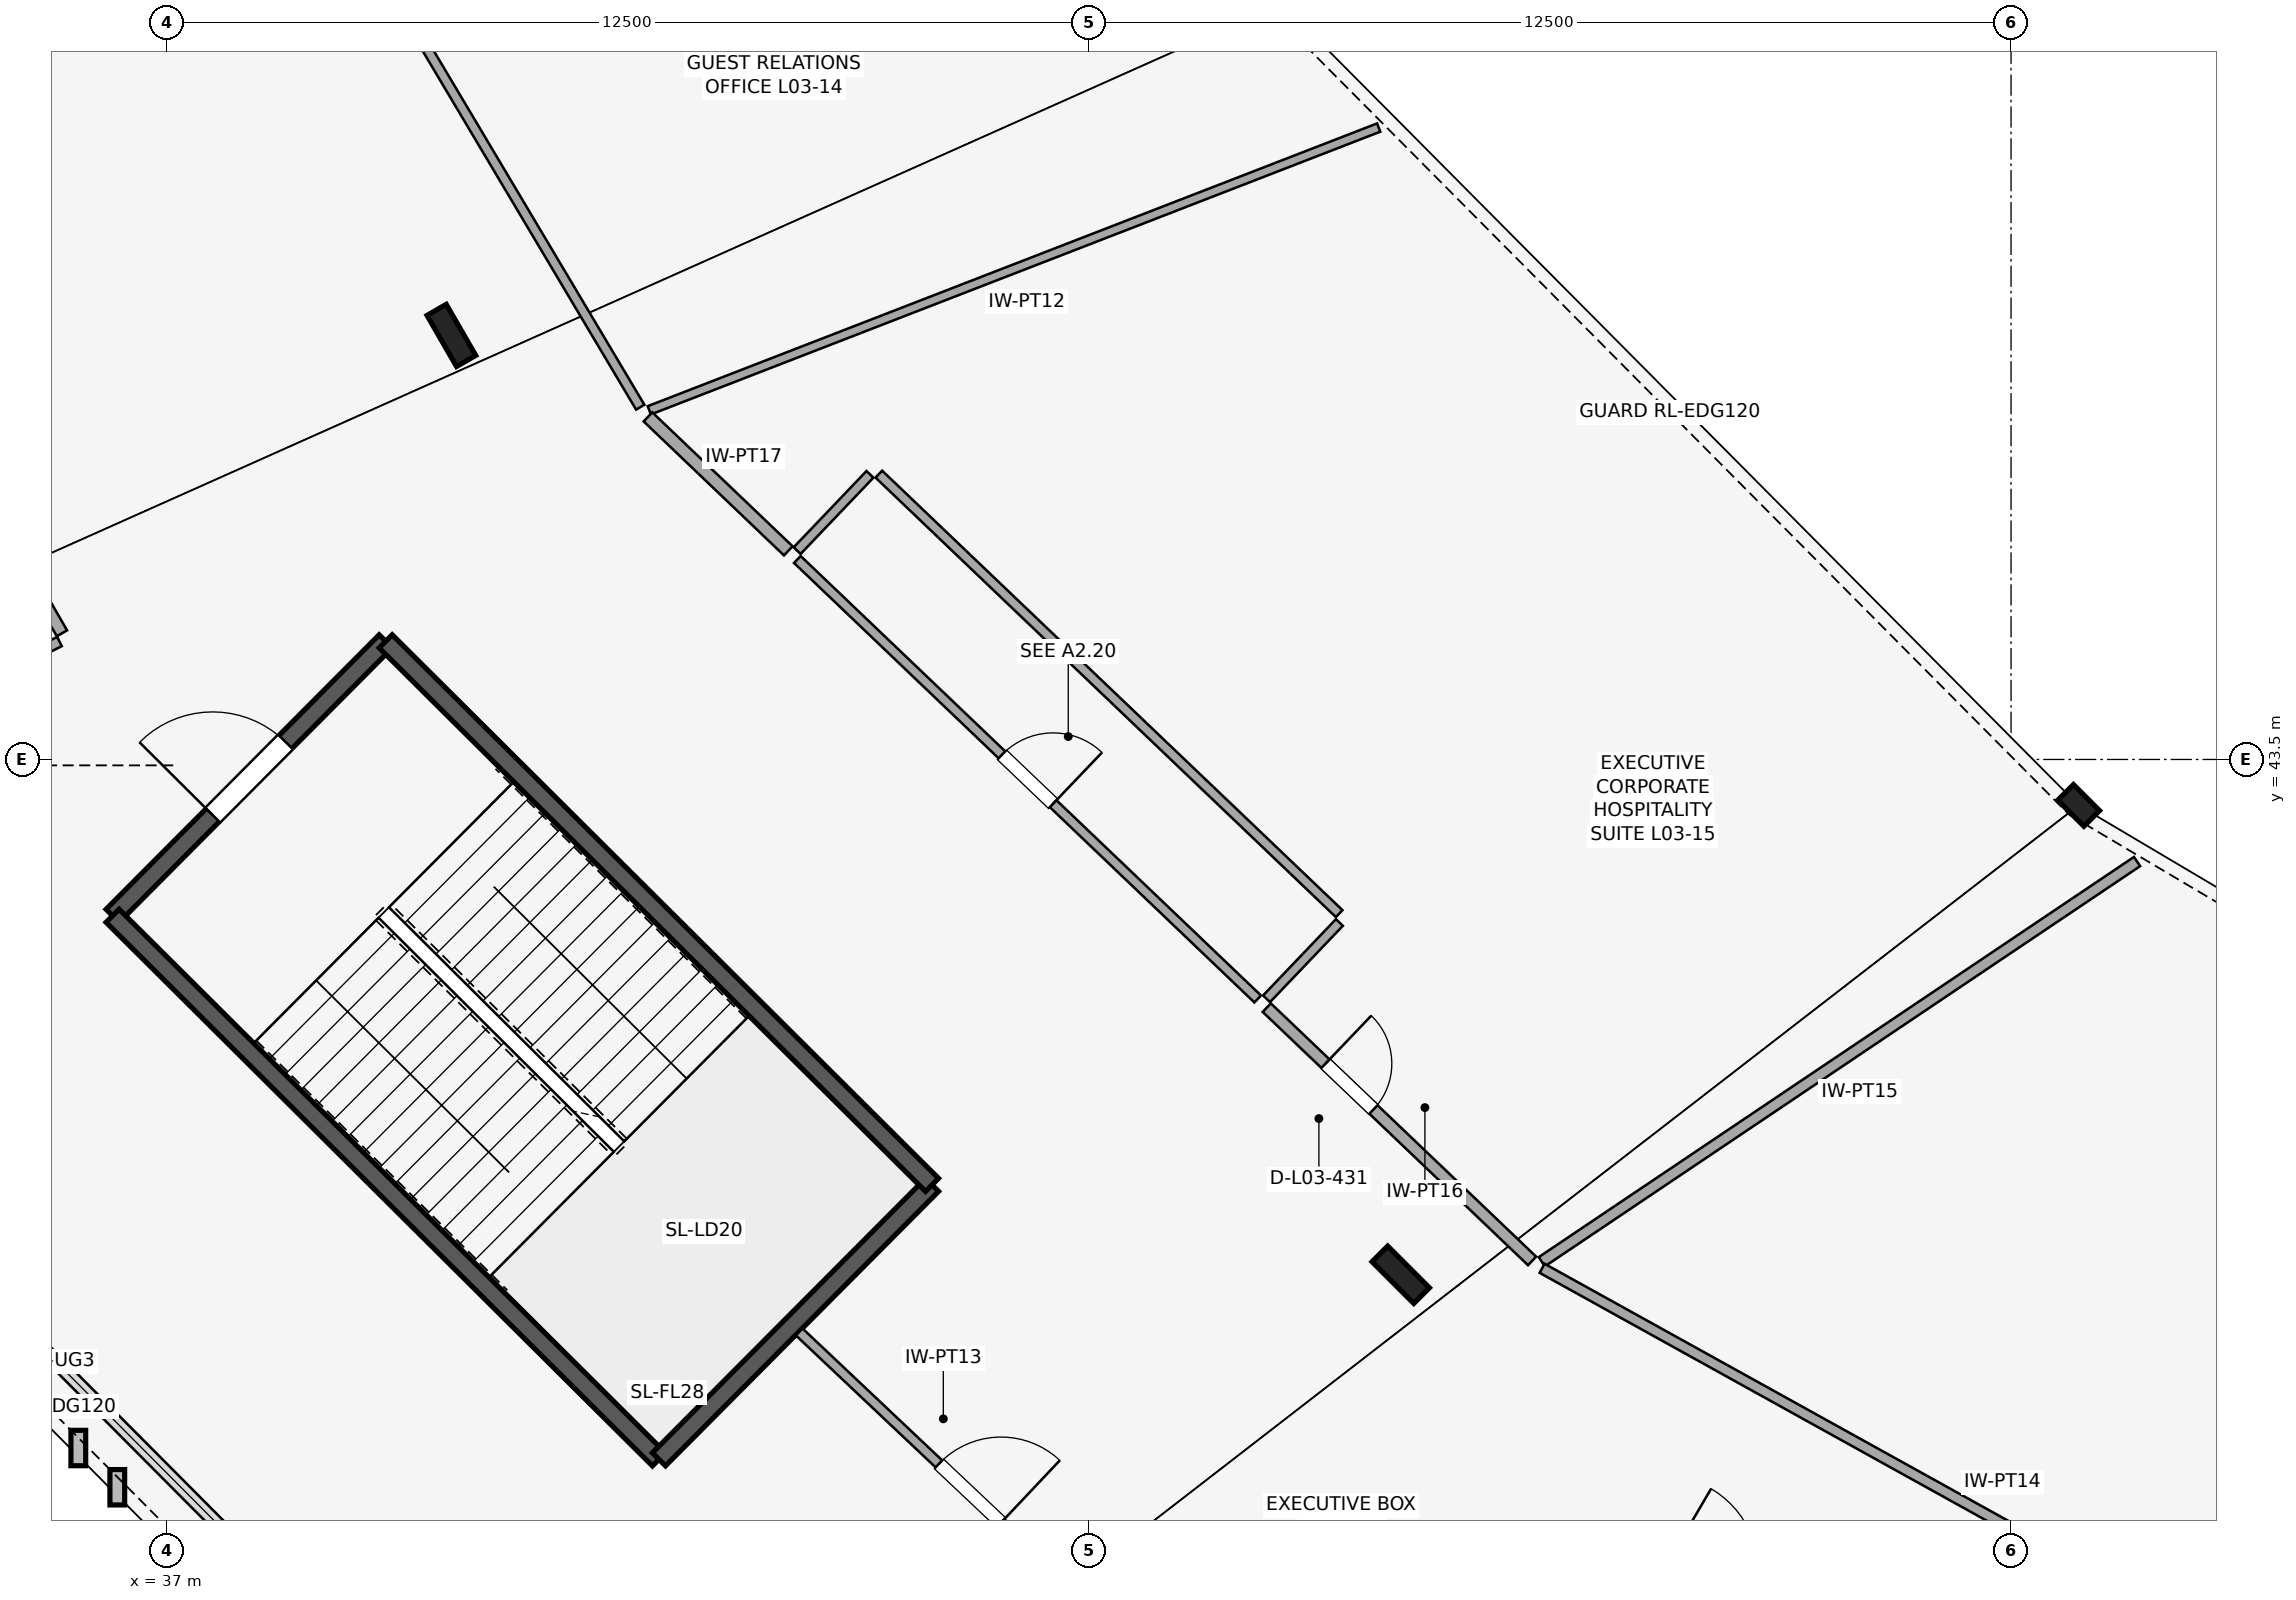
"""IFC4 building model, lengths in metres.
Left out: names, types, materials, properties, quantities, classifications, styles, units other than length and angle.
Written with IfcOpenShell. Run it as: python <this file> out.ifc"""

import sys

from ifc_helpers import new_model, si_unit, direction, frame, frame_2d, origin, origin_2d, place, context, subcontext, project, spatial, rectangle, i_section, extrude, element, fill, save


model = new_model("IFC4")
c1 = context("Model", 3, precision=1e-05, world=origin(), true_north=direction((0.0, 1.0)))
c2 = subcontext(c1, "Body", "Model", "MODEL_VIEW")
j1 = project(units=[si_unit("LENGTHUNIT", "METRE"), si_unit("PLANEANGLEUNIT", "RADIAN")], contexts=[c1])
p1 = place(None, origin())
s1 = spatial("IfcSite", under=j1, at=p1, CompositionType="ELEMENT")
p2 = place(p1, origin())
s2 = spatial("IfcBuilding", under=s1, at=p2, CompositionType="ELEMENT")
p3 = place(p2, frame((0.0, 0.0, 15.6)))
s3 = spatial("IfcBuildingStorey", under=s2, at=p3, CompositionType="ELEMENT", Elevation=15.6)
p4 = place(p3, frame((62.917, 42.877, 0.0), z_axis=(0.0, 0.0, 1.0), x_axis=(-0.707106781187, -0.707106781187, 0.0)))
e1 = element("IfcColumn", 1, at=p4, inside=s3, PredefinedType="COLUMN", context=c2, shape_type="SweptSolid", body=[
    extrude(i_section(OverallWidth=0.3, OverallDepth=0.5, WebThickness=0.014, FlangeThickness=0.028, FilletRadius=0.027, at=origin_2d()), origin(), (0.0, 0.0, 1.0), 3.48),
])
for number, where, z_axis, x_axis in (
    (2, (40.852, 49.25, 0.0), (0.0, 0.0, 1.0), (-0.866, -0.5, 0.0)),
    (3, (53.724, 36.513, 0.0), (0.0, 0.0, 1.0), (-0.707, -0.707, 0.0)),
):
    element("IfcColumn", number, at=place(p3, frame(where, z_axis=z_axis, x_axis=x_axis)), inside=s3, PredefinedType="COLUMN", context=c2, shape_type="SweptSolid", body=[
        extrude(i_section(OverallWidth=0.3, OverallDepth=0.8, WebThickness=0.018, FlangeThickness=0.033, FilletRadius=0.03, at=origin_2d()), origin(), (0.0, 0.0, 1.0), 5.2),
    ])
p5 = place(p3, frame((39.961, 45.102, 0.0), z_axis=(0.0, 0.0, 1.0), x_axis=(-0.705314141126, -0.708894888067, 0.0)))
e4 = element("IfcWall", 4, at=p5, inside=s3, PredefinedType="SHEAR", context=c2, shape_type="SweptSolid", body=[
    extrude(rectangle(XDim=5.25, YDim=0.25, at=frame_2d((2.625, 0.0))), origin(), (0.0, 0.0, 1.0), 4.9),
])
p6 = place(p5, frame((1.925, 0.0, 0.0)))
e5 = element("IfcOpeningElement", 5, at=p6, cuts=e4, PredefinedType="OPENING", context=c2, shape_type="SweptSolid", body=[
    extrude(rectangle(XDim=1.4, YDim=2.2, at=frame_2d((0.7, 1.1))), frame((0.0, 0.135, 0.0), z_axis=(0.0, -1.0, 0.0), x_axis=(1.0, 0.0, 0.0)), (0.0, 0.0, 1.0), 0.27),
])
p7 = place(p3, frame((36.258, 41.38, 0.0), z_axis=(0.0, 0.0, 1.0), x_axis=(0.708891762409, -0.705317282639, 0.0)))
e6 = element("IfcWall", 6, at=p7, inside=s3, PredefinedType="SHEAR", context=c2, shape_type="SweptSolid", body=[
    extrude(rectangle(XDim=10.45, YDim=0.25, at=frame_2d((5.225, 0.0))), origin(), (0.0, 0.0, 1.0), 4.9),
])
p8 = place(p3, frame((43.666, 34.01, 0.0), z_axis=(0.0, 0.0, 1.0), x_axis=(0.705314141126, 0.708894888067, 0.0)))
e7 = element("IfcWall", 7, at=p8, inside=s3, PredefinedType="SHEAR", context=c2, shape_type="SweptSolid", body=[
    extrude(rectangle(XDim=5.25, YDim=0.25, at=frame_2d((2.625, 0.0))), origin(), (0.0, 0.0, 1.0), 4.9),
])
p9 = place(p3, frame((47.369, 37.731, 0.0), z_axis=(0.0, 0.0, 1.0), x_axis=(-0.708891762409, 0.705317282639, 0.0)))
e8 = element("IfcWall", 8, at=p9, inside=s3, PredefinedType="SHEAR", context=c2, shape_type="SweptSolid", body=[
    extrude(rectangle(XDim=10.45, YDim=0.25, at=frame_2d((5.225, 0.0))), origin(), (0.0, 0.0, 1.0), 4.9),
])
p10 = place(p3, frame((34.706, 62.908, 0.0), z_axis=(0.0, 0.0, 1.0), x_axis=(0.51138201062, -0.859353500728, 0.0)))
e9 = element("IfcWall", 9, at=p10, inside=s3, PredefinedType="PARTITIONING", context=c2, shape_type="SweptSolid", body=[
    extrude(rectangle(XDim=17.026, YDim=0.13, at=frame_2d((8.513, 0.0))), origin(), (0.0, 0.0, 1.0), 2.45),
])
p11 = place(p10, frame((7.973, 0.0, 0.0)))
e10 = element("IfcOpeningElement", 10, at=p11, cuts=e9, PredefinedType="OPENING", context=c2, shape_type="SweptSolid", body=[
    extrude(rectangle(XDim=1.08, YDim=2.24, at=frame_2d((0.54, 1.12))), frame((0.0, 0.075, 0.0), z_axis=(0.0, -1.0, 0.0), x_axis=(1.0, 0.0, 0.0)), (0.0, 0.0, 1.0), 0.15),
])
p12 = place(p3, frame((53.425, 52.068, 0.0), z_axis=(0.0, 0.0, 1.0), x_axis=(-0.932396771686, -0.36143638465, 0.0)))
e11 = element("IfcWall", 11, at=p12, inside=s3, PredefinedType="PARTITIONING", context=c2, shape_type="SweptSolid", body=[
    extrude(rectangle(XDim=10.607, YDim=0.12, at=frame_2d((5.303, 0.0))), origin(), (0.0, 0.0, 1.0), 2.45),
])
p13 = place(p3, frame((45.543, 46.212, 0.0), z_axis=(0.0, 0.0, 1.0), x_axis=(0.723282965578, -0.69055177337, 0.0)))
e12 = element("IfcWall", 12, at=p13, inside=s3, PredefinedType="PARTITIONING", context=c2, shape_type="SweptSolid", body=[
    extrude(rectangle(XDim=8.63, YDim=0.13, at=frame_2d((4.315, 0.0))), origin(), (0.0, 0.0, 1.0), 2.45),
])
p14 = place(p13, frame((3.835, 0.0, 0.0)))
e13 = element("IfcOpeningElement", 13, at=p14, cuts=e12, PredefinedType="OPENING", context=c2, shape_type="SweptSolid", body=[
    extrude(rectangle(XDim=0.96, YDim=2.24, at=frame_2d((0.48, 1.12))), frame((0.0, 0.075, 0.0), z_axis=(0.0, -1.0, 0.0), x_axis=(1.0, 0.0, 0.0)), (0.0, 0.0, 1.0), 0.15),
])
p15 = place(p3, frame((46.648, 47.369, 0.0), z_axis=(0.0, 0.0, 1.0), x_axis=(0.723310584954, -0.690522843716, 0.0)))
e14 = element("IfcWall", 14, at=p15, inside=s3, PredefinedType="PARTITIONING", context=c2, shape_type="SweptSolid", body=[
    extrude(rectangle(XDim=8.63, YDim=0.13, at=frame_2d((4.315, 0.0))), origin(), (0.0, 0.0, 1.0), 2.45),
])
p16 = place(p3, frame((45.54, 46.332, 0.0), z_axis=(0.0, 0.0, 1.0), x_axis=(0.690528527034, 0.723305159219, 0.0)))
e15 = element("IfcWall", 15, at=p16, inside=s3, PredefinedType="PARTITIONING", context=c2, shape_type="SweptSolid", body=[
    extrude(rectangle(XDim=1.43, YDim=0.13, at=frame_2d((0.715, 0.0))), origin(), (0.0, 0.0, 1.0), 2.45),
])
p17 = place(p3, frame((51.905, 40.255, 0.0), z_axis=(0.0, 0.0, 1.0), x_axis=(0.690524478899, 0.723309023891, 0.0)))
e16 = element("IfcWall", 16, at=p17, inside=s3, PredefinedType="PARTITIONING", context=c2, shape_type="SweptSolid", body=[
    extrude(rectangle(XDim=1.43, YDim=0.13, at=frame_2d((0.715, 0.0))), origin(), (0.0, 0.0, 1.0), 2.45),
])
p18 = place(p3, frame((43.518, 48.145, 0.0), z_axis=(0.0, 0.0, 1.0), x_axis=(0.723347113938, -0.690484578218, 0.0)))
e17 = element("IfcWall", 17, at=p18, inside=s3, PredefinedType="PARTITIONING", context=c2, shape_type="SweptSolid", body=[
    extrude(rectangle(XDim=2.63, YDim=0.17, at=frame_2d((1.315, 0.0))), origin(), (0.0, 0.0, 1.0), 2.45),
])
p19 = place(p3, frame((51.908, 40.135, 0.0), z_axis=(0.0, 0.0, 1.0), x_axis=(0.723287562658, -0.690546958363, 0.0)))
e18 = element("IfcWall", 18, at=p19, inside=s3, PredefinedType="PARTITIONING", context=c2, shape_type="SweptSolid", body=[
    extrude(rectangle(XDim=4.974, YDim=0.16, at=frame_2d((2.487, 0.0))), origin(), (0.0, 0.0, 1.0), 2.45),
])
p20 = place(p19, frame((1.1, 0.0, 0.0)))
e19 = element("IfcOpeningElement", 19, at=p20, cuts=e18, PredefinedType="OPENING", context=c2, shape_type="SweptSolid", body=[
    extrude(rectangle(XDim=0.9, YDim=2.24, at=frame_2d((0.45, 1.12))), frame((0.0, 0.09, 0.0), z_axis=(0.0, -1.0, 0.0), x_axis=(1.0, 0.0, 0.0)), (0.0, 0.0, 1.0), 0.18),
])
p21 = place(p3, frame((63.708, 42.116, 0.0), z_axis=(0.0, 0.0, 1.0), x_axis=(-0.82986180863, -0.557968976357, 0.0)))
e20 = element("IfcWall", 20, at=p21, inside=s3, PredefinedType="PARTITIONING", context=c2, shape_type="SweptSolid", body=[
    extrude(rectangle(XDim=9.726, YDim=0.15, at=frame_2d((4.863, 0.0))), origin(), (0.0, 0.0, 1.0), 2.45),
])
p22 = place(p3, frame((55.641, 36.601, 0.0), z_axis=(0.0, 0.0, 1.0), x_axis=(0.874574509401, -0.484891150162, 0.0)))
e21 = element("IfcWall", 21, at=p22, inside=s3, PredefinedType="PARTITIONING", context=c2, shape_type="SweptSolid", body=[
    extrude(rectangle(XDim=19.609, YDim=0.14, at=frame_2d((9.805, 0.0))), origin(), (0.0, 0.0, 1.0), 2.45),
])
p23 = place(p22, frame((9.024, 0.0, 0.0)))
e22 = element("IfcOpeningElement", 22, at=p23, cuts=e21, PredefinedType="OPENING", context=c2, shape_type="SweptSolid", body=[
    extrude(rectangle(XDim=1.56, YDim=2.24, at=frame_2d((0.78, 1.12))), frame((0.0, 0.08, 0.0), z_axis=(0.0, -1.0, 0.0), x_axis=(1.0, 0.0, 0.0)), (0.0, 0.0, 1.0), 0.16),
])
p24 = place(p3, frame((32.912, 49.83, 0.0), z_axis=(0.0, 0.0, 1.0), x_axis=(0.498938381592, -0.86663746248, 0.0)))
e23 = element("IfcWall", 23, at=p24, inside=s3, PredefinedType="PARTITIONING", context=c2, shape_type="SweptSolid", body=[
    extrude(rectangle(XDim=5.33, YDim=0.16, at=frame_2d((2.665, 0.0))), origin(), (0.0, 0.0, 1.0), 2.45),
])
p25 = place(p24, frame((2.215, 0.0, 0.0)))
e24 = element("IfcOpeningElement", 24, at=p25, cuts=e23, PredefinedType="OPENING", context=c2, shape_type="SweptSolid", body=[
    extrude(rectangle(XDim=0.9, YDim=2.24, at=frame_2d((0.45, 1.12))), frame((0.0, 0.09, 0.0), z_axis=(0.0, -1.0, 0.0), x_axis=(1.0, 0.0, 0.0)), (0.0, 0.0, 1.0), 0.18),
])
p26 = place(p3, frame((35.538, 45.099, 0.0), z_axis=(0.0, 0.0, 1.0), x_axis=(-0.893748311222, -0.448568786463, 0.0)))
e25 = element("IfcWall", 25, at=p26, inside=s3, PredefinedType="PARTITIONING", context=c2, shape_type="SweptSolid", body=[
    extrude(rectangle(XDim=7.203, YDim=0.14, at=frame_2d((3.602, 0.0))), origin(), (0.0, 0.0, 1.0), 2.45),
])
p27 = place(p3, frame((45.568, 35.737, 0.0), z_axis=(0.0, 0.0, 1.0), x_axis=(0.727092872765, -0.686539113506, 0.0)))
e26 = element("IfcWall", 26, at=p27, inside=s3, PredefinedType="PARTITIONING", context=c2, shape_type="SweptSolid", body=[
    extrude(rectangle(XDim=6.369, YDim=0.13, at=frame_2d((3.185, 0.0))), origin(), (0.0, 0.0, 1.0), 2.45),
])
p28 = place(p27, frame((2.605, 0.0, 0.0)))
e27 = element("IfcOpeningElement", 27, at=p28, cuts=e26, PredefinedType="OPENING", context=c2, shape_type="SweptSolid", body=[
    extrude(rectangle(XDim=1.16, YDim=2.1, at=frame_2d((0.58, 1.05))), frame((0.0, 0.075, 0.0), z_axis=(0.0, -1.0, 0.0), x_axis=(1.0, 0.0, 0.0)), (0.0, 0.0, 1.0), 0.15),
])
p29 = place(p6, frame((1.4, 0.0, 0.0), z_axis=(0.0, 0.0, 1.0), x_axis=(-1.0, 0.0, 0.0)))
e28 = element("IfcDoor", 28, at=p29, inside=s3, OperationType="SINGLE_SWING_LEFT", PredefinedType="DOOR", context=c2, shape_type="SweptSolid", body=[
    extrude(rectangle(XDim=1.4, YDim=2.2, at=frame_2d((0.7, 1.1))), frame((0.0, 0.025, 0.0), z_axis=(0.0, -1.0, 0.0), x_axis=(1.0, 0.0, 0.0)), (0.0, 0.0, 1.0), 0.05),
])
fill(e5, e28)
p30 = place(p14, origin())
e29 = element("IfcDoor", 29, at=p30, inside=s3, OperationType="SINGLE_SWING_RIGHT", PredefinedType="DOOR", context=c2, shape_type="SweptSolid", body=[
    extrude(rectangle(XDim=0.96, YDim=2.24, at=frame_2d((0.48, 1.12))), frame((0.0, 0.025, 0.0), z_axis=(0.0, -1.0, 0.0), x_axis=(1.0, 0.0, 0.0)), (0.0, 0.0, 1.0), 0.05),
])
fill(e13, e29)
p31 = place(p20, origin())
e30 = element("IfcDoor", 30, at=p31, inside=s3, OperationType="SINGLE_SWING_LEFT", PredefinedType="DOOR", context=c2, shape_type="SweptSolid", body=[
    extrude(rectangle(XDim=0.9, YDim=2.24, at=frame_2d((0.45, 1.12))), frame((0.0, 0.025, 0.0), z_axis=(0.0, -1.0, 0.0), x_axis=(1.0, 0.0, 0.0)), (0.0, 0.0, 1.0), 0.05),
])
fill(e19, e30)
p32 = place(p28, origin())
e31 = element("IfcDoor", 31, at=p32, inside=s3, OperationType="SINGLE_SWING_RIGHT", PredefinedType="DOOR", context=c2, shape_type="SweptSolid", body=[
    extrude(rectangle(XDim=1.16, YDim=2.1, at=frame_2d((0.58, 1.05))), frame((0.0, 0.025, 0.0), z_axis=(0.0, -1.0, 0.0), x_axis=(1.0, 0.0, 0.0)), (0.0, 0.0, 1.0), 0.05),
])
fill(e27, e31)
save(model, sys.argv[1])
